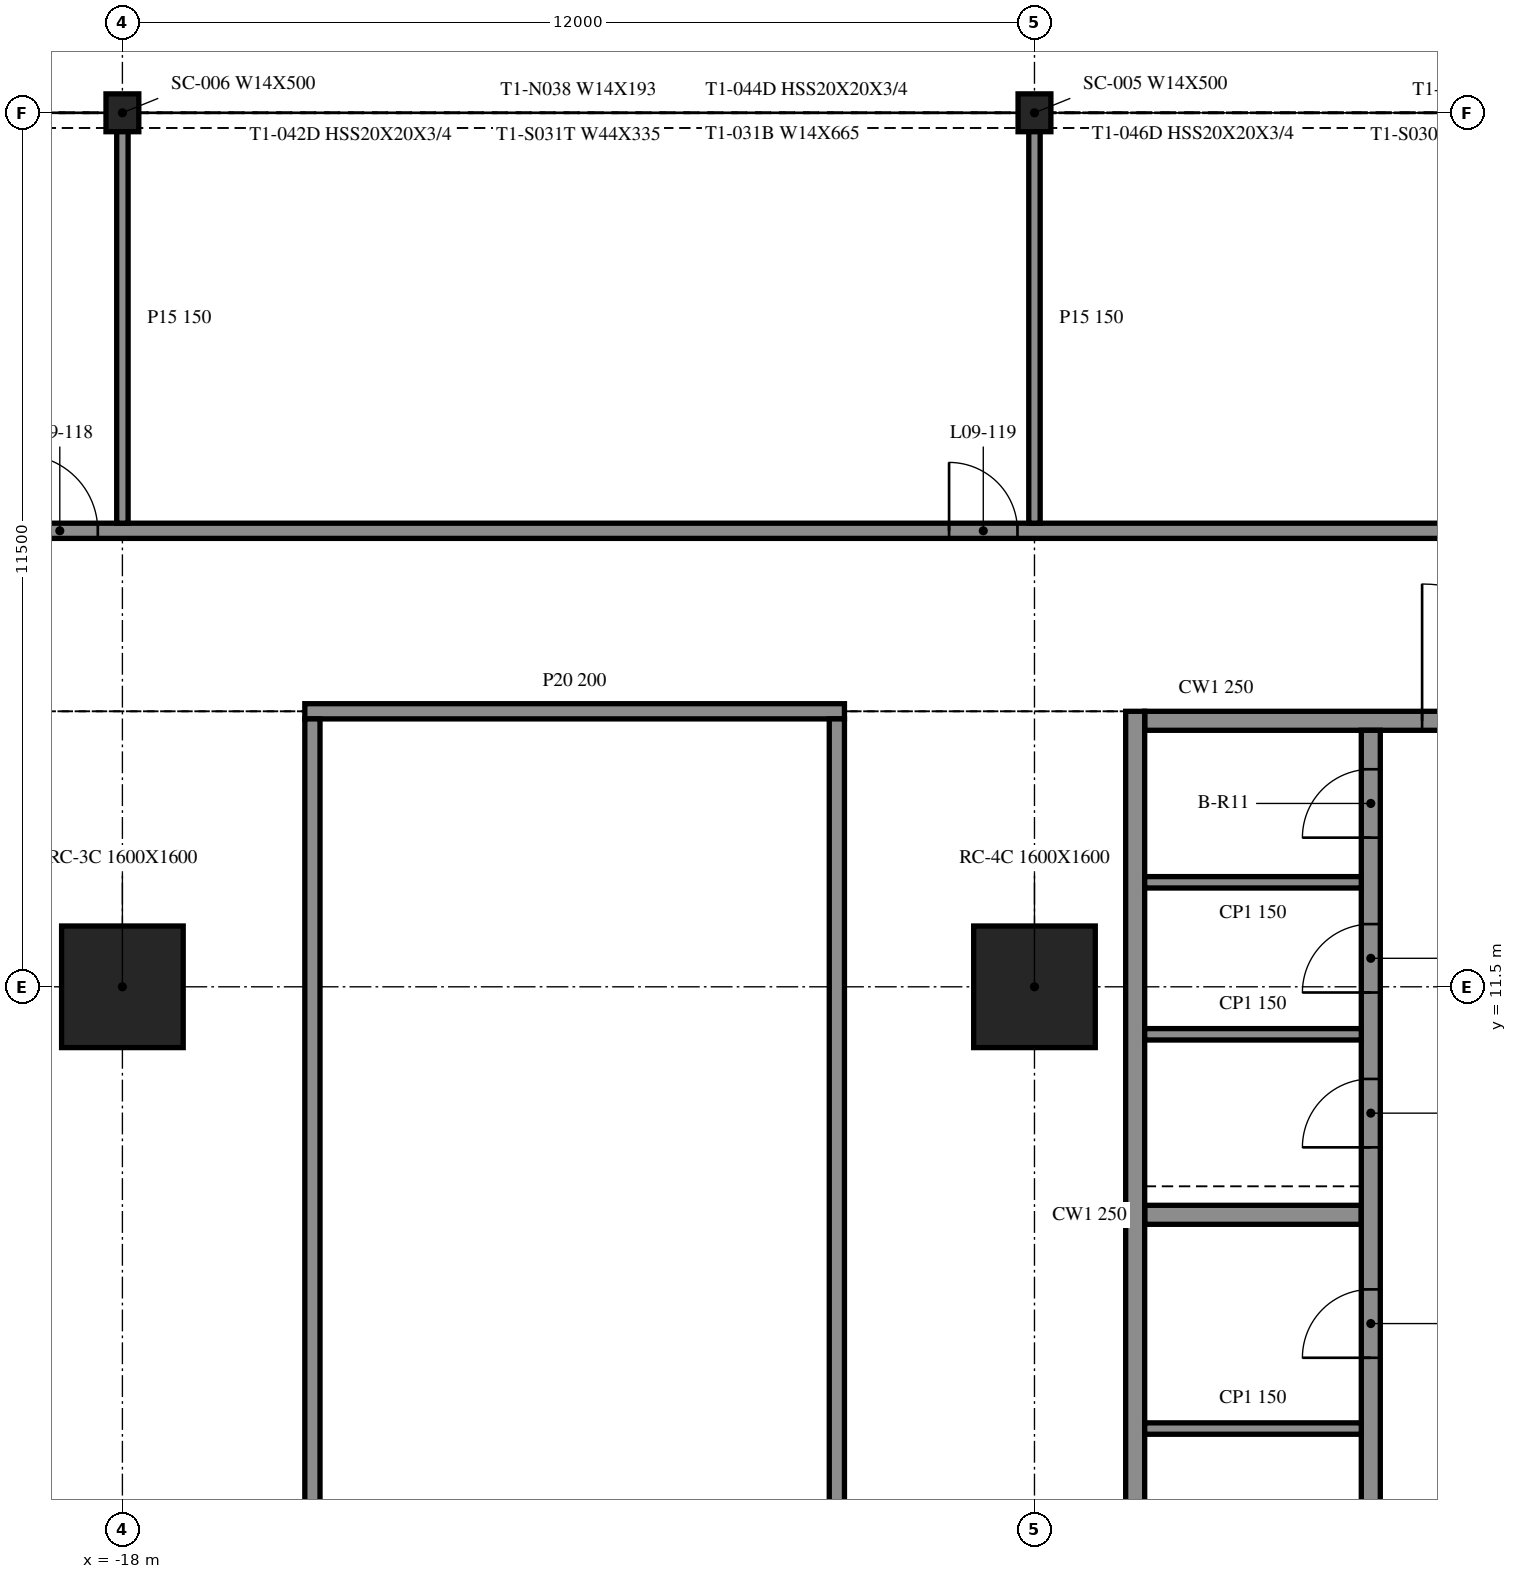
"""IFC4 building model, lengths in metres.
Left out: names, types, materials, properties, quantities, classifications, styles, units other than length and angle.
Written with IfcOpenShell. Run it as: python <this file> out.ifc"""

import sys

from ifc_helpers import new_model, si_unit, direction, frame, frame_2d, origin, origin_2d, place, context, subcontext, project, spatial, rectangle, i_section, extrude, element, fill, save


model = new_model("IFC4")
c1 = context("Model", 3, precision=1e-05, world=origin(), true_north=direction((0.0, 1.0)))
c2 = subcontext(c1, "Body", "Model", "MODEL_VIEW")
j1 = project(units=[si_unit("LENGTHUNIT", "METRE"), si_unit("PLANEANGLEUNIT", "RADIAN")], contexts=[c1])
p1 = place(None, origin())
s1 = spatial("IfcSite", under=j1, at=p1, CompositionType="ELEMENT")
p2 = place(p1, origin())
s2 = spatial("IfcBuilding", under=s1, at=p2, CompositionType="ELEMENT")
p3 = place(p2, frame((0.0, 0.0, 41.6)))
s3 = spatial("IfcBuildingStorey", under=s2, at=p3, CompositionType="ELEMENT", Elevation=41.6)
for number, where, z_axis, x_axis in (
    (1, (-18.0, 11.5, -0.55), (0.0, 0.0, 1.0), (1.0, 0.0, 0.0)),
    (2, (-6.0, 11.5, -0.55), (0.0, 0.0, 1.0), (1.0, 0.0, 0.0)),
):
    element("IfcColumn", number, at=place(p3, frame(where, z_axis=z_axis, x_axis=x_axis)), inside=s3, PredefinedType="COLUMN", context=c2, shape_type="SweptSolid", body=[
        extrude(rectangle(XDim=1.6, YDim=1.6, at=origin_2d()), origin(), (0.0, 0.0, 1.0), 4.61),
    ])
for number, where, z_axis, x_axis in (
    (3, (-6.0, 23.0, -0.55), (0.0, 0.0, 1.0), (1.0, 0.0, 0.0)),
    (4, (-18.0, 23.0, -0.55), (0.0, 0.0, 1.0), (1.0, 0.0, 0.0)),
):
    element("IfcColumn", number, at=place(p3, frame(where, z_axis=z_axis, x_axis=x_axis)), inside=s3, PredefinedType="COLUMN", context=c2, shape_type="SweptSolid", body=[
        extrude(i_section(OverallWidth=0.432, OverallDepth=0.498, WebThickness=0.056, FlangeThickness=0.089, at=origin_2d()), origin(), (0.0, 0.0, 1.0), 4.61),
    ])
p4 = place(p3, frame((-4.675, 15.125, 0.0), z_axis=(0.0, 0.0, 1.0), x_axis=(0.0, -1.0, 0.0)))
e5 = element("IfcWall", 5, at=p4, inside=s3, PredefinedType="SOLIDWALL", context=c2, shape_type="SweptSolid", body=[
    extrude(rectangle(XDim=24.25, YDim=0.25, at=frame_2d((12.125, 0.0))), origin(), (0.0, 0.0, 1.0), 4.06),
])
p5 = place(p3, frame((-4.55, 15.0, 0.0), z_axis=(0.0, 0.0, 1.0), x_axis=(1.0, 0.0, 0.0)))
e6 = element("IfcWall", 6, at=p5, inside=s3, PredefinedType="SOLIDWALL", context=c2, shape_type="SweptSolid", body=[
    extrude(rectangle(XDim=9.1, YDim=0.25, at=frame_2d((4.55, 0.0))), origin(), (0.0, 0.0, 1.0), 4.06),
])
p6 = place(p5, frame((3.65, 0.0, 0.0)))
e7 = element("IfcOpeningElement", 7, at=p6, cuts=e6, PredefinedType="OPENING", context=c2, shape_type="SweptSolid", body=[
    extrude(rectangle(XDim=1.8, YDim=2.1, at=frame_2d((0.9, 1.05))), frame((0.0, 0.135, 0.0), z_axis=(0.0, -1.0, 0.0), x_axis=(1.0, 0.0, 0.0)), (0.0, 0.0, 1.0), 0.27),
])
p7 = place(p3, frame((-1.575, -8.875, 0.0), z_axis=(0.0, 0.0, 1.0), x_axis=(0.0, 1.0, 0.0)))
e8 = element("IfcWall", 8, at=p7, inside=s3, PredefinedType="SOLIDWALL", context=c2, shape_type="SweptSolid", body=[
    extrude(rectangle(XDim=23.75, YDim=0.25, at=frame_2d((11.875, 0.0))), origin(), (0.0, 0.0, 1.0), 4.06),
])
p8 = place(p7, frame((7.356, 0.0, 0.0)))
e9 = element("IfcOpeningElement", 9, at=p8, cuts=e8, PredefinedType="OPENING", context=c2, shape_type="SweptSolid", body=[
    extrude(rectangle(XDim=0.9, YDim=2.1, at=frame_2d((0.45, 1.05))), frame((0.0, 0.135, 0.0), z_axis=(0.0, -1.0, 0.0), x_axis=(1.0, 0.0, 0.0)), (0.0, 0.0, 1.0), 0.27),
])
p9 = place(p7, frame((11.425, 0.0, 0.0)))
e10 = element("IfcOpeningElement", 10, at=p9, cuts=e8, PredefinedType="OPENING", context=c2, shape_type="SweptSolid", body=[
    extrude(rectangle(XDim=0.9, YDim=2.1, at=frame_2d((0.45, 1.05))), frame((0.0, 0.135, 0.0), z_axis=(0.0, -1.0, 0.0), x_axis=(1.0, 0.0, 0.0)), (0.0, 0.0, 1.0), 0.27),
])
p10 = place(p7, frame((15.494, 0.0, 0.0)))
e11 = element("IfcOpeningElement", 11, at=p10, cuts=e8, PredefinedType="OPENING", context=c2, shape_type="SweptSolid", body=[
    extrude(rectangle(XDim=0.9, YDim=2.1, at=frame_2d((0.45, 1.05))), frame((0.0, 0.135, 0.0), z_axis=(0.0, -1.0, 0.0), x_axis=(1.0, 0.0, 0.0)), (0.0, 0.0, 1.0), 0.27),
])
p11 = place(p7, frame((1.012, 0.0, 0.0)))
e12 = element("IfcOpeningElement", 12, at=p11, cuts=e8, PredefinedType="OPENING", context=c2, shape_type="SweptSolid", body=[
    extrude(rectangle(XDim=0.9, YDim=2.1, at=frame_2d((0.45, 1.05))), frame((0.0, 0.135, 0.0), z_axis=(0.0, -1.0, 0.0), x_axis=(1.0, 0.0, 0.0)), (0.0, 0.0, 1.0), 0.27),
])
p12 = place(p7, frame((4.087, 0.0, 0.0)))
e13 = element("IfcOpeningElement", 13, at=p12, cuts=e8, PredefinedType="OPENING", context=c2, shape_type="SweptSolid", body=[
    extrude(rectangle(XDim=0.9, YDim=2.1, at=frame_2d((0.45, 1.05))), frame((0.0, 0.135, 0.0), z_axis=(0.0, -1.0, 0.0), x_axis=(1.0, 0.0, 0.0)), (0.0, 0.0, 1.0), 0.27),
])
p13 = place(p7, frame((18.262, 0.0, 0.0)))
e14 = element("IfcOpeningElement", 14, at=p13, cuts=e8, PredefinedType="OPENING", context=c2, shape_type="SweptSolid", body=[
    extrude(rectangle(XDim=0.9, YDim=2.1, at=frame_2d((0.45, 1.05))), frame((0.0, 0.135, 0.0), z_axis=(0.0, -1.0, 0.0), x_axis=(1.0, 0.0, 0.0)), (0.0, 0.0, 1.0), 0.27),
])
p14 = place(p7, frame((20.3, 0.0, 0.0)))
e15 = element("IfcOpeningElement", 15, at=p14, cuts=e8, PredefinedType="OPENING", context=c2, shape_type="SweptSolid", body=[
    extrude(rectangle(XDim=0.9, YDim=2.1, at=frame_2d((0.45, 1.05))), frame((0.0, 0.135, 0.0), z_axis=(0.0, -1.0, 0.0), x_axis=(1.0, 0.0, 0.0)), (0.0, 0.0, 1.0), 0.27),
])
p15 = place(p7, frame((22.337, 0.0, 0.0)))
e16 = element("IfcOpeningElement", 16, at=p15, cuts=e8, PredefinedType="OPENING", context=c2, shape_type="SweptSolid", body=[
    extrude(rectangle(XDim=0.9, YDim=2.1, at=frame_2d((0.45, 1.05))), frame((0.0, 0.135, 0.0), z_axis=(0.0, -1.0, 0.0), x_axis=(1.0, 0.0, 0.0)), (0.0, 0.0, 1.0), 0.27),
])
p16 = place(p3, frame((-4.55, 8.5, 0.0), z_axis=(0.0, 0.0, 1.0), x_axis=(1.0, 0.0, 0.0)))
e17 = element("IfcWall", 17, at=p16, inside=s3, PredefinedType="SOLIDWALL", context=c2, shape_type="SweptSolid", body=[
    extrude(rectangle(XDim=2.85, YDim=0.25, at=frame_2d((1.425, 0.0))), origin(), (0.0, 0.0, 1.0), 4.06),
])
for number, where, z_axis, x_axis in (
    (18, (-4.55, 5.688, 0.0), (0.0, 0.0, 1.0), (1.0, 0.0, 0.0)),
    (19, (-4.55, 10.875, 0.0), (0.0, 0.0, 1.0), (1.0, 0.0, 0.0)),
    (20, (-4.55, 12.875, 0.0), (0.0, 0.0, 1.0), (1.0, 0.0, 0.0)),
):
    element("IfcWall", number, at=place(p3, frame(where, z_axis=z_axis, x_axis=x_axis)), inside=s3, PredefinedType="PARTITIONING", context=c2, shape_type="SweptSolid", body=[
        extrude(rectangle(XDim=2.85, YDim=0.15, at=frame_2d((1.425, 0.0))), origin(), (0.0, 0.0, 1.0), 4.06),
    ])
p17 = place(p3, frame((-15.6, 15.125, 0.0), z_axis=(0.0, 0.0, 1.0), x_axis=(1.0, 0.0, 0.0)))
e21 = element("IfcWall", 21, at=p17, inside=s3, PredefinedType="PARTITIONING", context=c2, shape_type="SweptSolid", body=[
    extrude(rectangle(XDim=7.1, YDim=0.2, at=frame_2d((3.55, 0.0))), origin(), (0.0, 0.0, 1.0), 4.06),
])
p18 = place(p3, frame((-40.624, 17.5, 0.0), z_axis=(0.0, 0.0, 1.0), x_axis=(1.0, 0.0, 0.0)))
e22 = element("IfcWall", 22, at=p18, inside=s3, PredefinedType="PARTITIONING", context=c2, shape_type="SweptSolid", body=[
    extrude(rectangle(XDim=94.524, YDim=0.2, at=frame_2d((47.262, 0.0))), origin(), (0.0, 0.0, 1.0), 4.06),
])
p19 = place(p18, frame((9.3, 0.0, 0.0)))
e23 = element("IfcOpeningElement", 23, at=p19, cuts=e22, PredefinedType="OPENING", context=c2, shape_type="SweptSolid", body=[
    extrude(rectangle(XDim=1.0, YDim=2.1, at=frame_2d((0.5, 1.05))), frame((0.0, 0.11, 0.0), z_axis=(0.0, -1.0, 0.0), x_axis=(1.0, 0.0, 0.0)), (0.0, 0.0, 1.0), 0.22),
])
p20 = place(p18, frame((21.3, 0.0, 0.0)))
e24 = element("IfcOpeningElement", 24, at=p20, cuts=e22, PredefinedType="OPENING", context=c2, shape_type="SweptSolid", body=[
    extrude(rectangle(XDim=1.0, YDim=2.1, at=frame_2d((0.5, 1.05))), frame((0.0, 0.11, 0.0), z_axis=(0.0, -1.0, 0.0), x_axis=(1.0, 0.0, 0.0)), (0.0, 0.0, 1.0), 0.22),
])
p21 = place(p18, frame((33.5, 0.0, 0.0)))
e25 = element("IfcOpeningElement", 25, at=p21, cuts=e22, PredefinedType="OPENING", context=c2, shape_type="SweptSolid", body=[
    extrude(rectangle(XDim=0.9, YDim=2.1, at=frame_2d((0.45, 1.05))), frame((0.0, 0.11, 0.0), z_axis=(0.0, -1.0, 0.0), x_axis=(1.0, 0.0, 0.0)), (0.0, 0.0, 1.0), 0.22),
])
p22 = place(p18, frame((45.1, 0.0, 0.0)))
e26 = element("IfcOpeningElement", 26, at=p22, cuts=e22, PredefinedType="OPENING", context=c2, shape_type="SweptSolid", body=[
    extrude(rectangle(XDim=1.2, YDim=2.1, at=frame_2d((0.6, 1.05))), frame((0.0, 0.11, 0.0), z_axis=(0.0, -1.0, 0.0), x_axis=(1.0, 0.0, 0.0)), (0.0, 0.0, 1.0), 0.22),
])
p23 = place(p18, frame((46.9, 0.0, 0.0)))
e27 = element("IfcOpeningElement", 27, at=p23, cuts=e22, PredefinedType="OPENING", context=c2, shape_type="SweptSolid", body=[
    extrude(rectangle(XDim=1.2, YDim=2.1, at=frame_2d((0.6, 1.05))), frame((0.0, 0.11, 0.0), z_axis=(0.0, -1.0, 0.0), x_axis=(1.0, 0.0, 0.0)), (0.0, 0.0, 1.0), 0.22),
])
p24 = place(p18, frame((58.9, 0.0, 0.0)))
e28 = element("IfcOpeningElement", 28, at=p24, cuts=e22, PredefinedType="OPENING", context=c2, shape_type="SweptSolid", body=[
    extrude(rectangle(XDim=1.2, YDim=2.1, at=frame_2d((0.6, 1.05))), frame((0.0, 0.11, 0.0), z_axis=(0.0, -1.0, 0.0), x_axis=(1.0, 0.0, 0.0)), (0.0, 0.0, 1.0), 0.22),
])
p25 = place(p18, frame((70.9, 0.0, 0.0)))
e29 = element("IfcOpeningElement", 29, at=p25, cuts=e22, PredefinedType="OPENING", context=c2, shape_type="SweptSolid", body=[
    extrude(rectangle(XDim=1.0, YDim=2.1, at=frame_2d((0.5, 1.05))), frame((0.0, 0.11, 0.0), z_axis=(0.0, -1.0, 0.0), x_axis=(1.0, 0.0, 0.0)), (0.0, 0.0, 1.0), 0.22),
])
p26 = place(p18, frame((82.9, 0.0, 0.0)))
e30 = element("IfcOpeningElement", 30, at=p26, cuts=e22, PredefinedType="OPENING", context=c2, shape_type="SweptSolid", body=[
    extrude(rectangle(XDim=1.0, YDim=2.1, at=frame_2d((0.5, 1.05))), frame((0.0, 0.11, 0.0), z_axis=(0.0, -1.0, 0.0), x_axis=(1.0, 0.0, 0.0)), (0.0, 0.0, 1.0), 0.22),
])
p27 = place(p3, frame((-18.0, 17.6, 0.0), z_axis=(0.0, 0.0, 1.0), x_axis=(0.0, 1.0, 0.0)))
e31 = element("IfcWall", 31, at=p27, inside=s3, PredefinedType="PARTITIONING", context=c2, shape_type="SweptSolid", body=[
    extrude(rectangle(XDim=5.4, YDim=0.15, at=frame_2d((2.7, 0.0))), origin(), (0.0, 0.0, 1.0), 4.06),
])
for number, where, z_axis, x_axis in (
    (32, (-15.5, -9.025, 0.0), (0.0, 0.0, 1.0), (0.0, 1.0, 0.0)),
    (33, (-8.6, -9.025, 0.0), (0.0, 0.0, 1.0), (0.0, 1.0, 0.0)),
):
    element("IfcWall", number, at=place(p3, frame(where, z_axis=z_axis, x_axis=x_axis)), inside=s3, PredefinedType="PARTITIONING", context=c2, shape_type="SweptSolid", body=[
        extrude(rectangle(XDim=24.05, YDim=0.2, at=frame_2d((12.025, 0.0))), origin(), (0.0, 0.0, 1.0), 4.06),
    ])
p28 = place(p3, frame((-6.0, 17.6, 0.0), z_axis=(0.0, 0.0, 1.0), x_axis=(0.0, 1.0, 0.0)))
e34 = element("IfcWall", 34, at=p28, inside=s3, PredefinedType="PARTITIONING", context=c2, shape_type="SweptSolid", body=[
    extrude(rectangle(XDim=5.4, YDim=0.15, at=frame_2d((2.7, 0.0))), origin(), (0.0, 0.0, 1.0), 4.06),
])
p29 = place(p6, origin())
e35 = element("IfcDoor", 35, at=p29, inside=s3, OperationType="DOUBLE_DOOR_SINGLE_SWING", PredefinedType="DOOR", context=c2, shape_type="SweptSolid", body=[
    extrude(rectangle(XDim=1.8, YDim=2.1, at=frame_2d((0.9, 1.05))), frame((0.0, 0.025, 0.0), z_axis=(0.0, -1.0, 0.0), x_axis=(1.0, 0.0, 0.0)), (0.0, 0.0, 1.0), 0.05),
])
fill(e7, e35)
p30 = place(p10, origin())
e36 = element("IfcDoor", 36, at=p30, inside=s3, OperationType="SINGLE_SWING_LEFT", PredefinedType="DOOR", context=c2, shape_type="SweptSolid", body=[
    extrude(rectangle(XDim=0.9, YDim=2.1, at=frame_2d((0.45, 1.05))), frame((0.0, 0.025, 0.0), z_axis=(0.0, -1.0, 0.0), x_axis=(1.0, 0.0, 0.0)), (0.0, 0.0, 1.0), 0.05),
])
fill(e11, e36)
p31 = place(p13, origin())
e37 = element("IfcDoor", 37, at=p31, inside=s3, OperationType="SINGLE_SWING_LEFT", PredefinedType="DOOR", context=c2, shape_type="SweptSolid", body=[
    extrude(rectangle(XDim=0.9, YDim=2.1, at=frame_2d((0.45, 1.05))), frame((0.0, 0.025, 0.0), z_axis=(0.0, -1.0, 0.0), x_axis=(1.0, 0.0, 0.0)), (0.0, 0.0, 1.0), 0.05),
])
fill(e14, e37)
p32 = place(p14, origin())
e38 = element("IfcDoor", 38, at=p32, inside=s3, OperationType="SINGLE_SWING_RIGHT", PredefinedType="DOOR", context=c2, shape_type="SweptSolid", body=[
    extrude(rectangle(XDim=0.9, YDim=2.1, at=frame_2d((0.45, 1.05))), frame((0.0, 0.025, 0.0), z_axis=(0.0, -1.0, 0.0), x_axis=(1.0, 0.0, 0.0)), (0.0, 0.0, 1.0), 0.05),
])
fill(e15, e38)
p33 = place(p15, origin())
e39 = element("IfcDoor", 39, at=p33, inside=s3, OperationType="SINGLE_SWING_LEFT", PredefinedType="DOOR", context=c2, shape_type="SweptSolid", body=[
    extrude(rectangle(XDim=0.9, YDim=2.1, at=frame_2d((0.45, 1.05))), frame((0.0, 0.025, 0.0), z_axis=(0.0, -1.0, 0.0), x_axis=(1.0, 0.0, 0.0)), (0.0, 0.0, 1.0), 0.05),
])
fill(e16, e39)
p34 = place(p20, origin())
e40 = element("IfcDoor", 40, at=p34, inside=s3, OperationType="SINGLE_SWING_LEFT", PredefinedType="DOOR", context=c2, shape_type="SweptSolid", body=[
    extrude(rectangle(XDim=1.0, YDim=2.1, at=frame_2d((0.5, 1.05))), frame((0.0, 0.025, 0.0), z_axis=(0.0, -1.0, 0.0), x_axis=(1.0, 0.0, 0.0)), (0.0, 0.0, 1.0), 0.05),
])
fill(e24, e40)
p35 = place(p21, origin())
e41 = element("IfcDoor", 41, at=p35, inside=s3, OperationType="SINGLE_SWING_LEFT", PredefinedType="DOOR", context=c2, shape_type="SweptSolid", body=[
    extrude(rectangle(XDim=0.9, YDim=2.1, at=frame_2d((0.45, 1.05))), frame((0.0, 0.025, 0.0), z_axis=(0.0, -1.0, 0.0), x_axis=(1.0, 0.0, 0.0)), (0.0, 0.0, 1.0), 0.05),
])
fill(e25, e41)
save(model, sys.argv[1])
